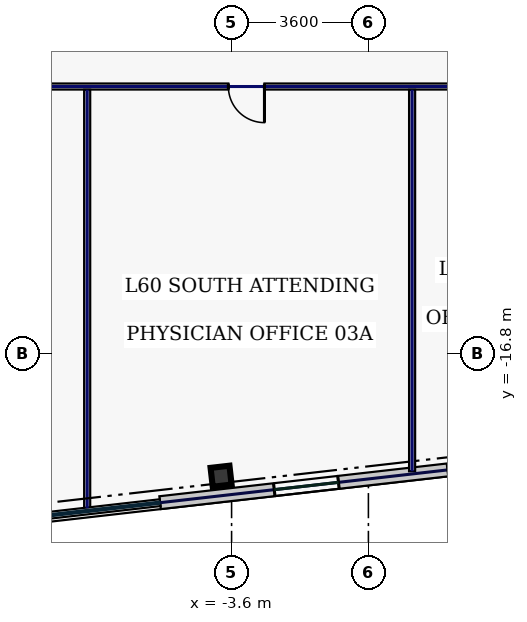
"""IFC4 building model, lengths in metres.
Left out: names, types, materials, properties, quantities, classifications, styles, units other than length and angle.
Written with IfcOpenShell. Run it as: python <this file> out.ifc"""

import sys

from ifc_helpers import new_model, si_unit, direction, frame, frame_2d, origin, origin_2d, place, context, subcontext, project, spatial, rectangle, hollow_rectangle, extrude, element, fill, save


model = new_model("IFC4")
c1 = context("Model", 3, precision=1e-05, world=origin(), true_north=direction((0.0, 1.0)))
c2 = subcontext(c1, "Body", "Model", "MODEL_VIEW")
j1 = project(units=[si_unit("LENGTHUNIT", "METRE"), si_unit("PLANEANGLEUNIT", "RADIAN")], contexts=[c1])
p1 = place(None, origin())
s1 = spatial("IfcSite", under=j1, at=p1, CompositionType="ELEMENT")
p2 = place(p1, origin())
s2 = spatial("IfcBuilding", under=s1, at=p2, CompositionType="ELEMENT")
p3 = place(p2, frame((0.0, 0.0, 259.0)))
s3 = spatial("IfcBuildingStorey", under=s2, at=p3, CompositionType="ELEMENT", Elevation=259.0)
p4 = place(p3, frame((-3.876, -20.035, 0.0), z_axis=(0.0, 0.0, 1.0), x_axis=(0.993571855677, 0.113203213768, 0.0)))
e1 = element("IfcColumn", 1, at=p4, inside=s3, PredefinedType="COLUMN", context=c2, shape_type="SweptSolid", body=[
    extrude(hollow_rectangle(XDim=0.5, YDim=0.5, WallThickness=0.025, at=origin_2d()), origin(), (0.0, 0.0, 1.0), 3.74),
])
p5 = place(p3, frame((-5.482, -20.731, 0.0), z_axis=(0.0, 0.0, 1.0), x_axis=(0.993571968199, 0.113202226169, 0.0)))
e2 = element("IfcWall", 2, at=p5, inside=s3, PredefinedType="STANDARD", context=c2, shape_type="SweptSolid", body=[
    extrude(rectangle(XDim=11.497, YDim=0.34, at=frame_2d((5.749, 0.0))), origin(), (0.0, 0.0, 1.0), 3.74),
])
p6 = place(p5, frame((3.024, 0.0, 0.88)))
e3 = element("IfcOpeningElement", 3, at=p6, cuts=e2, PredefinedType="OPENING", context=c2, shape_type="SweptSolid", body=[
    extrude(rectangle(XDim=1.7, YDim=1.95, at=frame_2d((0.85, 0.975))), frame((0.0, 0.18, 0.0), z_axis=(0.0, -1.0, 0.0), x_axis=(1.0, 0.0, 0.0)), (0.0, 0.0, 1.0), 0.36),
])
p7 = place(p5, frame((7.623, 0.0, 0.88)))
e4 = element("IfcOpeningElement", 4, at=p7, cuts=e2, PredefinedType="OPENING", context=c2, shape_type="SweptSolid", body=[
    extrude(rectangle(XDim=0.85, YDim=1.85, at=frame_2d((0.425, 0.925))), frame((0.0, 0.18, 0.0), z_axis=(0.0, -1.0, 0.0), x_axis=(1.0, 0.0, 0.0)), (0.0, 0.0, 1.0), 0.36),
])
p8 = place(p3, frame((24.815, -9.78, 0.0), z_axis=(0.0, 0.0, 1.0), x_axis=(-1.0, 0.0, 0.0)))
e5 = element("IfcWall", 5, at=p8, inside=s3, PredefinedType="PARTITIONING", context=c2, shape_type="SweptSolid", body=[
    extrude(rectangle(XDim=37.35, YDim=0.16, at=frame_2d((18.675, 0.0))), origin(), (0.0, 0.0, 1.0), 3.74),
])
p9 = place(p8, frame((27.55, 0.0, 0.0)))
e6 = element("IfcOpeningElement", 6, at=p9, cuts=e5, PredefinedType="OPENING", context=c2, shape_type="SweptSolid", body=[
    extrude(rectangle(XDim=0.95, YDim=2.2, at=frame_2d((0.475, 1.1))), frame((0.0, 0.09, 0.0), z_axis=(0.0, -1.0, 0.0), x_axis=(1.0, 0.0, 0.0)), (0.0, 0.0, 1.0), 0.18),
])
p10 = place(p8, frame((19.275, 0.0, 0.0)))
e7 = element("IfcOpeningElement", 7, at=p10, cuts=e5, PredefinedType="OPENING", context=c2, shape_type="SweptSolid", body=[
    extrude(rectangle(XDim=1.3, YDim=2.2, at=frame_2d((0.65, 1.1))), frame((0.0, 0.09, 0.0), z_axis=(0.0, -1.0, 0.0), x_axis=(1.0, 0.0, 0.0)), (0.0, 0.0, 1.0), 0.18),
])
p11 = place(p8, frame((9.725, 0.0, 0.0)))
e8 = element("IfcOpeningElement", 8, at=p11, cuts=e5, PredefinedType="OPENING", context=c2, shape_type="SweptSolid", body=[
    extrude(rectangle(XDim=1.3, YDim=2.2, at=frame_2d((0.65, 1.1))), frame((0.0, 0.09, 0.0), z_axis=(0.0, -1.0, 0.0), x_axis=(1.0, 0.0, 0.0)), (0.0, 0.0, 1.0), 0.18),
])
p12 = place(p8, frame((2.044, 0.0, 0.0)))
e9 = element("IfcOpeningElement", 9, at=p12, cuts=e5, PredefinedType="OPENING", context=c2, shape_type="SweptSolid", body=[
    extrude(rectangle(XDim=0.95, YDim=2.2, at=frame_2d((0.475, 1.1))), frame((0.0, 0.09, 0.0), z_axis=(0.0, -1.0, 0.0), x_axis=(1.0, 0.0, 0.0)), (0.0, 0.0, 1.0), 0.18),
])
p13 = place(p3, frame((-7.4, -20.879, 0.0), z_axis=(0.0, 0.0, 1.0), x_axis=(0.0, 1.0, 0.0)))
e10 = element("IfcWall", 10, at=p13, inside=s3, PredefinedType="PARTITIONING", context=c2, shape_type="SweptSolid", body=[
    extrude(rectangle(XDim=11.014, YDim=0.16, at=frame_2d((5.507, 0.0))), origin(), (0.0, 0.0, 1.0), 3.74),
])
p14 = place(p3, frame((1.15, -19.906, 0.0), z_axis=(0.0, 0.0, 1.0), x_axis=(0.0, 1.0, 0.0)))
e11 = element("IfcWall", 11, at=p14, inside=s3, PredefinedType="PARTITIONING", context=c2, shape_type="SweptSolid", body=[
    extrude(rectangle(XDim=10.041, YDim=0.16, at=frame_2d((5.02, 0.0))), origin(), (0.0, 0.0, 1.0), 3.74),
])
p15 = place(p6, origin())
e12 = element("IfcWindow", 12, at=p15, inside=s3, PartitioningType="SINGLE_PANEL", PredefinedType="WINDOW", context=c2, shape_type="SweptSolid", body=[
    extrude(rectangle(XDim=1.7, YDim=1.95, at=frame_2d((0.85, 0.975))), frame((0.0, 0.03, 0.0), z_axis=(0.0, -1.0, 0.0), x_axis=(1.0, 0.0, 0.0)), (0.0, 0.0, 1.0), 0.06),
])
fill(e3, e12)
p16 = place(p9, origin())
e13 = element("IfcDoor", 13, at=p16, inside=s3, OperationType="SINGLE_SWING_LEFT", PredefinedType="DOOR", context=c2, shape_type="SweptSolid", body=[
    extrude(rectangle(XDim=0.95, YDim=2.2, at=frame_2d((0.475, 1.1))), frame((0.0, 0.025, 0.0), z_axis=(0.0, -1.0, 0.0), x_axis=(1.0, 0.0, 0.0)), (0.0, 0.0, 1.0), 0.05),
])
fill(e6, e13)
save(model, sys.argv[1])
